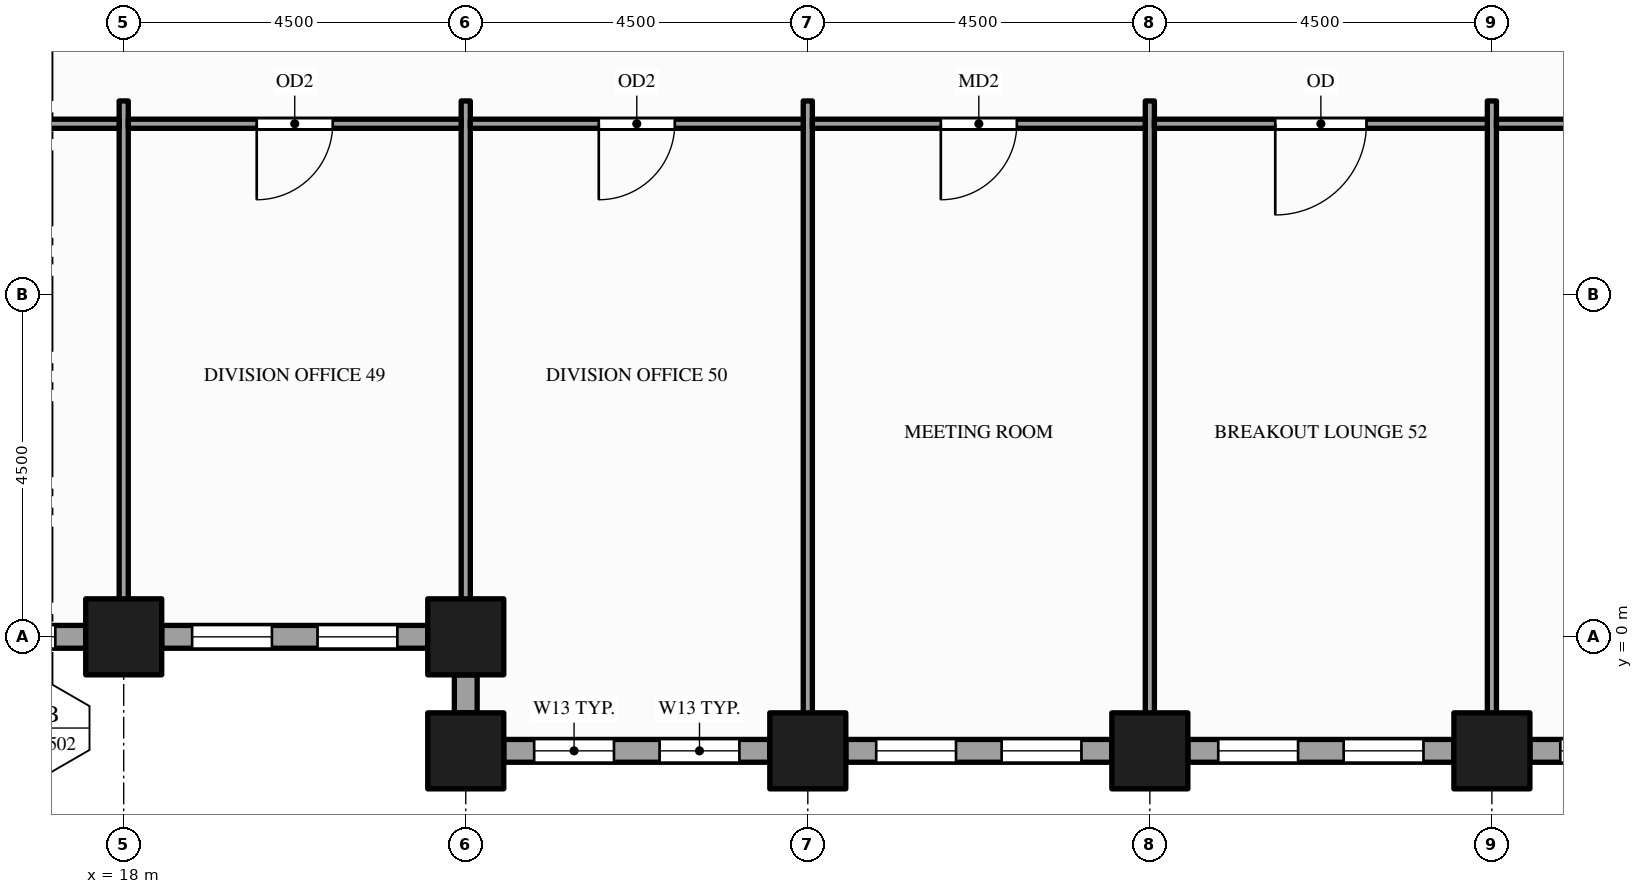
"""IFC4 building model, lengths in metres.
Left out: names, types, materials, properties, quantities, classifications, styles, units other than length and angle.
Written with IfcOpenShell. Run it as: python <this file> out.ifc"""

import sys

from ifc_helpers import new_model, si_unit, direction, frame, frame_2d, origin, origin_2d, place, context, subcontext, project, spatial, rectangle, hollow_rectangle, extrude, element, fill, save


model = new_model("IFC4")
c1 = context("Model", 3, precision=1e-05, world=origin(), true_north=direction((0.0, 1.0)))
c2 = subcontext(c1, "Body", "Model", "MODEL_VIEW")
j1 = project(units=[si_unit("LENGTHUNIT", "METRE"), si_unit("PLANEANGLEUNIT", "RADIAN")], contexts=[c1])
p1 = place(None, origin())
s1 = spatial("IfcSite", under=j1, at=p1, CompositionType="ELEMENT")
p2 = place(p1, origin())
s2 = spatial("IfcBuilding", under=s1, at=p2, CompositionType="ELEMENT")
p3 = place(p2, frame((0.0, 0.0, 107.0)))
s3 = spatial("IfcBuildingStorey", under=s2, at=p3, CompositionType="ELEMENT", Elevation=107.0)
for number, where, z_axis, x_axis in (
    (1, (18.0, 0.0, -0.15), (0.0, 0.0, 1.0), (1.0, 0.0, 0.0)),
    (2, (22.5, -1.5, -0.15), (0.0, 0.0, 1.0), (1.0, 0.0, 0.0)),
    (3, (22.5, 0.0, -0.15), (0.0, 0.0, 1.0), (1.0, 0.0, 0.0)),
    (4, (27.0, -1.5, -0.15), (0.0, 0.0, 1.0), (1.0, 0.0, 0.0)),
    (5, (31.5, -1.5, -0.15), (0.0, 0.0, 1.0), (1.0, 0.0, 0.0)),
    (6, (36.0, -1.5, -0.15), (0.0, 0.0, 1.0), (1.0, 0.0, 0.0)),
):
    element("IfcColumn", number, at=place(p3, frame(where, z_axis=z_axis, x_axis=x_axis)), inside=s3, PredefinedType="COLUMN", context=c2, shape_type="SweptSolid", body=[
        extrude(hollow_rectangle(XDim=1.0, YDim=1.0, WallThickness=0.05, at=origin_2d()), origin(), (0.0, 0.0, 1.0), 4.0),
    ])
p4 = place(p3, frame((23.0, -1.5, 0.0), z_axis=(0.0, 0.0, 1.0), x_axis=(1.0, 0.0, 0.0)))
e7 = element("IfcWall", 7, at=p4, inside=s3, PredefinedType="STANDARD", context=c2, shape_type="SweptSolid", body=[
    extrude(rectangle(XDim=3.5, YDim=0.3, at=frame_2d((1.75, 0.0))), origin(), (0.0, 0.0, 1.0), 3.154),
])
p5 = place(p4, frame((0.4, 0.0, 0.9)))
e8 = element("IfcOpeningElement", 8, at=p5, cuts=e7, PredefinedType="OPENING", context=c2, shape_type="SweptSolid", body=[
    extrude(rectangle(XDim=1.05, YDim=2.0, at=frame_2d((0.525, 1.0))), frame((0.0, 0.16, 0.0), z_axis=(0.0, -1.0, 0.0), x_axis=(1.0, 0.0, 0.0)), (0.0, 0.0, 1.0), 0.32),
])
p6 = place(p4, frame((2.05, 0.0, 0.9)))
e9 = element("IfcOpeningElement", 9, at=p6, cuts=e7, PredefinedType="OPENING", context=c2, shape_type="SweptSolid", body=[
    extrude(rectangle(XDim=1.05, YDim=2.0, at=frame_2d((0.525, 1.0))), frame((0.0, 0.16, 0.0), z_axis=(0.0, -1.0, 0.0), x_axis=(1.0, 0.0, 0.0)), (0.0, 0.0, 1.0), 0.32),
])
p7 = place(p3, frame((27.5, -1.5, 0.0), z_axis=(0.0, 0.0, 1.0), x_axis=(1.0, 0.0, 0.0)))
e10 = element("IfcWall", 10, at=p7, inside=s3, PredefinedType="STANDARD", context=c2, shape_type="SweptSolid", body=[
    extrude(rectangle(XDim=3.5, YDim=0.3, at=frame_2d((1.75, 0.0))), origin(), (0.0, 0.0, 1.0), 3.154),
])
p8 = place(p7, frame((0.4, 0.0, 0.9)))
e11 = element("IfcOpeningElement", 11, at=p8, cuts=e10, PredefinedType="OPENING", context=c2, shape_type="SweptSolid", body=[
    extrude(rectangle(XDim=1.05, YDim=2.0, at=frame_2d((0.525, 1.0))), frame((0.0, 0.16, 0.0), z_axis=(0.0, -1.0, 0.0), x_axis=(1.0, 0.0, 0.0)), (0.0, 0.0, 1.0), 0.32),
])
p9 = place(p7, frame((2.05, 0.0, 0.9)))
e12 = element("IfcOpeningElement", 12, at=p9, cuts=e10, PredefinedType="OPENING", context=c2, shape_type="SweptSolid", body=[
    extrude(rectangle(XDim=1.05, YDim=2.0, at=frame_2d((0.525, 1.0))), frame((0.0, 0.16, 0.0), z_axis=(0.0, -1.0, 0.0), x_axis=(1.0, 0.0, 0.0)), (0.0, 0.0, 1.0), 0.32),
])
p10 = place(p3, frame((32.0, -1.5, 0.0), z_axis=(0.0, 0.0, 1.0), x_axis=(1.0, 0.0, 0.0)))
e13 = element("IfcWall", 13, at=p10, inside=s3, PredefinedType="STANDARD", context=c2, shape_type="SweptSolid", body=[
    extrude(rectangle(XDim=3.5, YDim=0.3, at=frame_2d((1.75, 0.0))), origin(), (0.0, 0.0, 1.0), 3.154),
])
p11 = place(p10, frame((0.4, 0.0, 0.9)))
e14 = element("IfcOpeningElement", 14, at=p11, cuts=e13, PredefinedType="OPENING", context=c2, shape_type="SweptSolid", body=[
    extrude(rectangle(XDim=1.05, YDim=2.0, at=frame_2d((0.525, 1.0))), frame((0.0, 0.16, 0.0), z_axis=(0.0, -1.0, 0.0), x_axis=(1.0, 0.0, 0.0)), (0.0, 0.0, 1.0), 0.32),
])
p12 = place(p10, frame((2.05, 0.0, 0.9)))
e15 = element("IfcOpeningElement", 15, at=p12, cuts=e13, PredefinedType="OPENING", context=c2, shape_type="SweptSolid", body=[
    extrude(rectangle(XDim=1.05, YDim=2.0, at=frame_2d((0.525, 1.0))), frame((0.0, 0.16, 0.0), z_axis=(0.0, -1.0, 0.0), x_axis=(1.0, 0.0, 0.0)), (0.0, 0.0, 1.0), 0.32),
])
p13 = place(p3, frame((36.5, -1.5, 0.0), z_axis=(0.0, 0.0, 1.0), x_axis=(1.0, 0.0, 0.0)))
e16 = element("IfcWall", 16, at=p13, inside=s3, PredefinedType="STANDARD", context=c2, shape_type="SweptSolid", body=[
    extrude(rectangle(XDim=3.5, YDim=0.3, at=frame_2d((1.75, 0.0))), origin(), (0.0, 0.0, 1.0), 3.154),
])
p14 = place(p13, frame((0.4, 0.0, 0.9)))
e17 = element("IfcOpeningElement", 17, at=p14, cuts=e16, PredefinedType="OPENING", context=c2, shape_type="SweptSolid", body=[
    extrude(rectangle(XDim=1.05, YDim=2.0, at=frame_2d((0.525, 1.0))), frame((0.0, 0.16, 0.0), z_axis=(0.0, -1.0, 0.0), x_axis=(1.0, 0.0, 0.0)), (0.0, 0.0, 1.0), 0.32),
])
p15 = place(p13, frame((2.05, 0.0, 0.9)))
e18 = element("IfcOpeningElement", 18, at=p15, cuts=e16, PredefinedType="OPENING", context=c2, shape_type="SweptSolid", body=[
    extrude(rectangle(XDim=1.05, YDim=2.0, at=frame_2d((0.525, 1.0))), frame((0.0, 0.16, 0.0), z_axis=(0.0, -1.0, 0.0), x_axis=(1.0, 0.0, 0.0)), (0.0, 0.0, 1.0), 0.32),
])
p16 = place(p3, frame((14.0, 0.0, 0.0), z_axis=(0.0, 0.0, 1.0), x_axis=(1.0, 0.0, 0.0)))
e19 = element("IfcWall", 19, at=p16, inside=s3, PredefinedType="STANDARD", context=c2, shape_type="SweptSolid", body=[
    extrude(rectangle(XDim=3.5, YDim=0.3, at=frame_2d((1.75, 0.0))), origin(), (0.0, 0.0, 1.0), 3.154),
])
p17 = place(p16, frame((0.4, 0.0, 0.9)))
e20 = element("IfcOpeningElement", 20, at=p17, cuts=e19, PredefinedType="OPENING", context=c2, shape_type="SweptSolid", body=[
    extrude(rectangle(XDim=1.05, YDim=2.0, at=frame_2d((0.525, 1.0))), frame((0.0, 0.16, 0.0), z_axis=(0.0, -1.0, 0.0), x_axis=(1.0, 0.0, 0.0)), (0.0, 0.0, 1.0), 0.32),
])
p18 = place(p16, frame((2.05, 0.0, 0.9)))
e21 = element("IfcOpeningElement", 21, at=p18, cuts=e19, PredefinedType="OPENING", context=c2, shape_type="SweptSolid", body=[
    extrude(rectangle(XDim=1.05, YDim=2.0, at=frame_2d((0.525, 1.0))), frame((0.0, 0.16, 0.0), z_axis=(0.0, -1.0, 0.0), x_axis=(1.0, 0.0, 0.0)), (0.0, 0.0, 1.0), 0.32),
])
p19 = place(p3, frame((18.5, 0.0, 0.0), z_axis=(0.0, 0.0, 1.0), x_axis=(1.0, 0.0, 0.0)))
e22 = element("IfcWall", 22, at=p19, inside=s3, PredefinedType="STANDARD", context=c2, shape_type="SweptSolid", body=[
    extrude(rectangle(XDim=3.5, YDim=0.3, at=frame_2d((1.75, 0.0))), origin(), (0.0, 0.0, 1.0), 3.154),
])
p20 = place(p19, frame((0.4, 0.0, 0.9)))
e23 = element("IfcOpeningElement", 23, at=p20, cuts=e22, PredefinedType="OPENING", context=c2, shape_type="SweptSolid", body=[
    extrude(rectangle(XDim=1.05, YDim=2.0, at=frame_2d((0.525, 1.0))), frame((0.0, 0.16, 0.0), z_axis=(0.0, -1.0, 0.0), x_axis=(1.0, 0.0, 0.0)), (0.0, 0.0, 1.0), 0.32),
])
p21 = place(p19, frame((2.05, 0.0, 0.9)))
e24 = element("IfcOpeningElement", 24, at=p21, cuts=e22, PredefinedType="OPENING", context=c2, shape_type="SweptSolid", body=[
    extrude(rectangle(XDim=1.05, YDim=2.0, at=frame_2d((0.525, 1.0))), frame((0.0, 0.16, 0.0), z_axis=(0.0, -1.0, 0.0), x_axis=(1.0, 0.0, 0.0)), (0.0, 0.0, 1.0), 0.32),
])
p22 = place(p3, frame((22.5, -0.5, 0.0), z_axis=(0.0, 0.0, 1.0), x_axis=(0.0, -1.0, 0.0)))
e25 = element("IfcWall", 25, at=p22, inside=s3, PredefinedType="STANDARD", context=c2, shape_type="SweptSolid", body=[
    extrude(rectangle(XDim=0.5, YDim=0.3, at=frame_2d((0.25, 0.0))), origin(), (0.0, 0.0, 1.0), 3.154),
])
for number, where, z_axis, x_axis in (
    (26, (18.0, 0.15, 0.0), (0.0, 0.0, 1.0), (0.0, 1.0, 0.0)),
    (27, (22.5, 0.15, 0.0), (0.0, 0.0, 1.0), (0.0, 1.0, 0.0)),
):
    element("IfcWall", number, at=place(p3, frame(where, z_axis=z_axis, x_axis=x_axis)), inside=s3, PredefinedType="PARTITIONING", context=c2, shape_type="SweptSolid", body=[
        extrude(rectangle(XDim=6.9, YDim=0.12, at=frame_2d((3.45, 0.0))), origin(), (0.0, 0.0, 1.0), 2.938),
    ])
for number, where, z_axis, x_axis in (
    (28, (27.0, -1.35, 0.0), (0.0, 0.0, 1.0), (0.0, 1.0, 0.0)),
    (29, (31.5, -1.35, 0.0), (0.0, 0.0, 1.0), (0.0, 1.0, 0.0)),
    (30, (36.0, -1.35, 0.0), (0.0, 0.0, 1.0), (0.0, 1.0, 0.0)),
):
    element("IfcWall", number, at=place(p3, frame(where, z_axis=z_axis, x_axis=x_axis)), inside=s3, PredefinedType="PARTITIONING", context=c2, shape_type="SweptSolid", body=[
        extrude(rectangle(XDim=8.4, YDim=0.12, at=frame_2d((4.2, 0.0))), origin(), (0.0, 0.0, 1.0), 2.938),
    ])
p23 = place(p3, frame((13.56, 6.75, 0.0), z_axis=(0.0, 0.0, 1.0), x_axis=(1.0, 0.0, 0.0)))
e31 = element("IfcWall", 31, at=p23, inside=s3, PredefinedType="PARTITIONING", context=c2, shape_type="SweptSolid", body=[
    extrude(rectangle(XDim=4.38, YDim=0.12, at=frame_2d((2.19, 0.0))), origin(), (0.0, 0.0, 1.0), 2.938),
])
p24 = place(p23, frame((1.69, 0.0, 0.0)))
e32 = element("IfcOpeningElement", 32, at=p24, cuts=e31, PredefinedType="OPENING", context=c2, shape_type="SweptSolid", body=[
    extrude(rectangle(XDim=1.0, YDim=2.1, at=frame_2d((0.5, 1.05))), frame((0.0, 0.07, 0.0), z_axis=(0.0, -1.0, 0.0), x_axis=(1.0, 0.0, 0.0)), (0.0, 0.0, 1.0), 0.14),
])
p25 = place(p3, frame((18.06, 6.75, 0.0), z_axis=(0.0, 0.0, 1.0), x_axis=(1.0, 0.0, 0.0)))
e33 = element("IfcWall", 33, at=p25, inside=s3, PredefinedType="PARTITIONING", context=c2, shape_type="SweptSolid", body=[
    extrude(rectangle(XDim=4.38, YDim=0.12, at=frame_2d((2.19, 0.0))), origin(), (0.0, 0.0, 1.0), 2.938),
])
p26 = place(p25, frame((1.69, 0.0, 0.0)))
e34 = element("IfcOpeningElement", 34, at=p26, cuts=e33, PredefinedType="OPENING", context=c2, shape_type="SweptSolid", body=[
    extrude(rectangle(XDim=1.0, YDim=2.1, at=frame_2d((0.5, 1.05))), frame((0.0, 0.07, 0.0), z_axis=(0.0, -1.0, 0.0), x_axis=(1.0, 0.0, 0.0)), (0.0, 0.0, 1.0), 0.14),
])
p27 = place(p3, frame((22.56, 6.75, 0.0), z_axis=(0.0, 0.0, 1.0), x_axis=(1.0, 0.0, 0.0)))
e35 = element("IfcWall", 35, at=p27, inside=s3, PredefinedType="PARTITIONING", context=c2, shape_type="SweptSolid", body=[
    extrude(rectangle(XDim=4.38, YDim=0.12, at=frame_2d((2.19, 0.0))), origin(), (0.0, 0.0, 1.0), 2.76),
])
p28 = place(p27, frame((1.69, 0.0, 0.0)))
e36 = element("IfcOpeningElement", 36, at=p28, cuts=e35, PredefinedType="OPENING", context=c2, shape_type="SweptSolid", body=[
    extrude(rectangle(XDim=1.0, YDim=2.1, at=frame_2d((0.5, 1.05))), frame((0.0, 0.07, 0.0), z_axis=(0.0, -1.0, 0.0), x_axis=(1.0, 0.0, 0.0)), (0.0, 0.0, 1.0), 0.14),
])
p29 = place(p3, frame((27.06, 6.75, 0.0), z_axis=(0.0, 0.0, 1.0), x_axis=(1.0, 0.0, 0.0)))
e37 = element("IfcWall", 37, at=p29, inside=s3, PredefinedType="PARTITIONING", context=c2, shape_type="SweptSolid", body=[
    extrude(rectangle(XDim=4.38, YDim=0.12, at=frame_2d((2.19, 0.0))), origin(), (0.0, 0.0, 1.0), 2.938),
])
p30 = place(p29, frame((1.69, 0.0, 0.0)))
e38 = element("IfcOpeningElement", 38, at=p30, cuts=e37, PredefinedType="OPENING", context=c2, shape_type="SweptSolid", body=[
    extrude(rectangle(XDim=1.0, YDim=2.1, at=frame_2d((0.5, 1.05))), frame((0.0, 0.07, 0.0), z_axis=(0.0, -1.0, 0.0), x_axis=(1.0, 0.0, 0.0)), (0.0, 0.0, 1.0), 0.14),
])
p31 = place(p3, frame((31.56, 6.75, 0.0), z_axis=(0.0, 0.0, 1.0), x_axis=(1.0, 0.0, 0.0)))
e39 = element("IfcWall", 39, at=p31, inside=s3, PredefinedType="PARTITIONING", context=c2, shape_type="SweptSolid", body=[
    extrude(rectangle(XDim=4.38, YDim=0.12, at=frame_2d((2.19, 0.0))), origin(), (0.0, 0.0, 1.0), 2.938),
])
p32 = place(p31, frame((1.59, 0.0, 0.0)))
e40 = element("IfcOpeningElement", 40, at=p32, cuts=e39, PredefinedType="OPENING", context=c2, shape_type="SweptSolid", body=[
    extrude(rectangle(XDim=1.2, YDim=2.1, at=frame_2d((0.6, 1.05))), frame((0.0, 0.07, 0.0), z_axis=(0.0, -1.0, 0.0), x_axis=(1.0, 0.0, 0.0)), (0.0, 0.0, 1.0), 0.14),
])
p33 = place(p3, frame((36.06, 6.75, 0.0), z_axis=(0.0, 0.0, 1.0), x_axis=(1.0, 0.0, 0.0)))
e41 = element("IfcWall", 41, at=p33, inside=s3, PredefinedType="PARTITIONING", context=c2, shape_type="SweptSolid", body=[
    extrude(rectangle(XDim=4.38, YDim=0.12, at=frame_2d((2.19, 0.0))), origin(), (0.0, 0.0, 1.0), 2.938),
])
p34 = place(p33, frame((1.59, 0.0, 0.0)))
e42 = element("IfcOpeningElement", 42, at=p34, cuts=e41, PredefinedType="OPENING", context=c2, shape_type="SweptSolid", body=[
    extrude(rectangle(XDim=1.2, YDim=2.1, at=frame_2d((0.6, 1.05))), frame((0.0, 0.07, 0.0), z_axis=(0.0, -1.0, 0.0), x_axis=(1.0, 0.0, 0.0)), (0.0, 0.0, 1.0), 0.14),
])
p35 = place(p5, origin())
e43 = element("IfcWindow", 43, at=p35, inside=s3, PartitioningType="SINGLE_PANEL", PredefinedType="WINDOW", context=c2, shape_type="SweptSolid", body=[
    extrude(rectangle(XDim=1.05, YDim=2.0, at=frame_2d((0.525, 1.0))), frame((0.0, 0.03, 0.0), z_axis=(0.0, -1.0, 0.0), x_axis=(1.0, 0.0, 0.0)), (0.0, 0.0, 1.0), 0.06),
])
fill(e8, e43)
p36 = place(p6, origin())
e44 = element("IfcWindow", 44, at=p36, inside=s3, PartitioningType="SINGLE_PANEL", PredefinedType="WINDOW", context=c2, shape_type="SweptSolid", body=[
    extrude(rectangle(XDim=1.05, YDim=2.0, at=frame_2d((0.525, 1.0))), frame((0.0, 0.03, 0.0), z_axis=(0.0, -1.0, 0.0), x_axis=(1.0, 0.0, 0.0)), (0.0, 0.0, 1.0), 0.06),
])
fill(e9, e44)
p37 = place(p8, origin())
e45 = element("IfcWindow", 45, at=p37, inside=s3, PartitioningType="SINGLE_PANEL", PredefinedType="WINDOW", context=c2, shape_type="SweptSolid", body=[
    extrude(rectangle(XDim=1.05, YDim=2.0, at=frame_2d((0.525, 1.0))), frame((0.0, 0.03, 0.0), z_axis=(0.0, -1.0, 0.0), x_axis=(1.0, 0.0, 0.0)), (0.0, 0.0, 1.0), 0.06),
])
fill(e11, e45)
p38 = place(p9, origin())
e46 = element("IfcWindow", 46, at=p38, inside=s3, PartitioningType="SINGLE_PANEL", PredefinedType="WINDOW", context=c2, shape_type="SweptSolid", body=[
    extrude(rectangle(XDim=1.05, YDim=2.0, at=frame_2d((0.525, 1.0))), frame((0.0, 0.03, 0.0), z_axis=(0.0, -1.0, 0.0), x_axis=(1.0, 0.0, 0.0)), (0.0, 0.0, 1.0), 0.06),
])
fill(e12, e46)
p39 = place(p11, origin())
e47 = element("IfcWindow", 47, at=p39, inside=s3, PartitioningType="SINGLE_PANEL", PredefinedType="WINDOW", context=c2, shape_type="SweptSolid", body=[
    extrude(rectangle(XDim=1.05, YDim=2.0, at=frame_2d((0.525, 1.0))), frame((0.0, 0.03, 0.0), z_axis=(0.0, -1.0, 0.0), x_axis=(1.0, 0.0, 0.0)), (0.0, 0.0, 1.0), 0.06),
])
fill(e14, e47)
p40 = place(p12, origin())
e48 = element("IfcWindow", 48, at=p40, inside=s3, PartitioningType="SINGLE_PANEL", PredefinedType="WINDOW", context=c2, shape_type="SweptSolid", body=[
    extrude(rectangle(XDim=1.05, YDim=2.0, at=frame_2d((0.525, 1.0))), frame((0.0, 0.03, 0.0), z_axis=(0.0, -1.0, 0.0), x_axis=(1.0, 0.0, 0.0)), (0.0, 0.0, 1.0), 0.06),
])
fill(e15, e48)
p41 = place(p14, origin())
e49 = element("IfcWindow", 49, at=p41, inside=s3, PartitioningType="SINGLE_PANEL", PredefinedType="WINDOW", context=c2, shape_type="SweptSolid", body=[
    extrude(rectangle(XDim=1.05, YDim=2.0, at=frame_2d((0.525, 1.0))), frame((0.0, 0.03, 0.0), z_axis=(0.0, -1.0, 0.0), x_axis=(1.0, 0.0, 0.0)), (0.0, 0.0, 1.0), 0.06),
])
fill(e17, e49)
p42 = place(p18, origin())
e50 = element("IfcWindow", 50, at=p42, inside=s3, PartitioningType="SINGLE_PANEL", PredefinedType="WINDOW", context=c2, shape_type="SweptSolid", body=[
    extrude(rectangle(XDim=1.05, YDim=2.0, at=frame_2d((0.525, 1.0))), frame((0.0, 0.03, 0.0), z_axis=(0.0, -1.0, 0.0), x_axis=(1.0, 0.0, 0.0)), (0.0, 0.0, 1.0), 0.06),
])
fill(e21, e50)
p43 = place(p20, origin())
e51 = element("IfcWindow", 51, at=p43, inside=s3, PartitioningType="SINGLE_PANEL", PredefinedType="WINDOW", context=c2, shape_type="SweptSolid", body=[
    extrude(rectangle(XDim=1.05, YDim=2.0, at=frame_2d((0.525, 1.0))), frame((0.0, 0.03, 0.0), z_axis=(0.0, -1.0, 0.0), x_axis=(1.0, 0.0, 0.0)), (0.0, 0.0, 1.0), 0.06),
])
fill(e23, e51)
p44 = place(p21, origin())
e52 = element("IfcWindow", 52, at=p44, inside=s3, PartitioningType="SINGLE_PANEL", PredefinedType="WINDOW", context=c2, shape_type="SweptSolid", body=[
    extrude(rectangle(XDim=1.05, YDim=2.0, at=frame_2d((0.525, 1.0))), frame((0.0, 0.03, 0.0), z_axis=(0.0, -1.0, 0.0), x_axis=(1.0, 0.0, 0.0)), (0.0, 0.0, 1.0), 0.06),
])
fill(e24, e52)
p45 = place(p26, origin())
e53 = element("IfcDoor", 53, at=p45, inside=s3, OperationType="SINGLE_SWING_LEFT", PredefinedType="DOOR", context=c2, shape_type="SweptSolid", body=[
    extrude(rectangle(XDim=1.0, YDim=2.1, at=frame_2d((0.5, 1.05))), frame((0.0, 0.025, 0.0), z_axis=(0.0, -1.0, 0.0), x_axis=(1.0, 0.0, 0.0)), (0.0, 0.0, 1.0), 0.05),
])
fill(e34, e53)
p46 = place(p28, origin())
e54 = element("IfcDoor", 54, at=p46, inside=s3, OperationType="SINGLE_SWING_LEFT", PredefinedType="DOOR", context=c2, shape_type="SweptSolid", body=[
    extrude(rectangle(XDim=1.0, YDim=2.1, at=frame_2d((0.5, 1.05))), frame((0.0, 0.025, 0.0), z_axis=(0.0, -1.0, 0.0), x_axis=(1.0, 0.0, 0.0)), (0.0, 0.0, 1.0), 0.05),
])
fill(e36, e54)
p47 = place(p30, origin())
e55 = element("IfcDoor", 55, at=p47, inside=s3, OperationType="SINGLE_SWING_LEFT", PredefinedType="DOOR", context=c2, shape_type="SweptSolid", body=[
    extrude(rectangle(XDim=1.0, YDim=2.1, at=frame_2d((0.5, 1.05))), frame((0.0, 0.025, 0.0), z_axis=(0.0, -1.0, 0.0), x_axis=(1.0, 0.0, 0.0)), (0.0, 0.0, 1.0), 0.05),
])
fill(e38, e55)
p48 = place(p32, origin())
e56 = element("IfcDoor", 56, at=p48, inside=s3, OperationType="SINGLE_SWING_LEFT", PredefinedType="DOOR", context=c2, shape_type="SweptSolid", body=[
    extrude(rectangle(XDim=1.2, YDim=2.1, at=frame_2d((0.6, 1.05))), frame((0.0, 0.025, 0.0), z_axis=(0.0, -1.0, 0.0), x_axis=(1.0, 0.0, 0.0)), (0.0, 0.0, 1.0), 0.05),
])
fill(e40, e56)
save(model, sys.argv[1])
